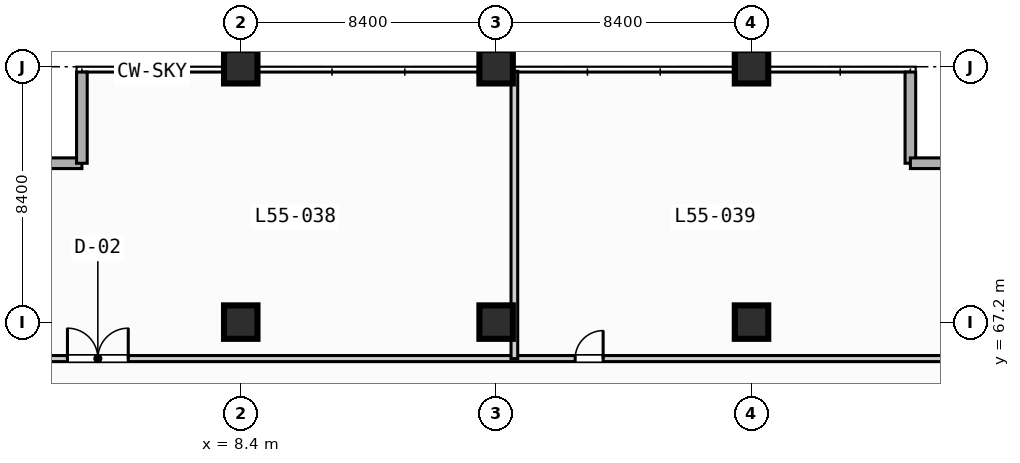
"""IFC4 building model, lengths in metres.
Left out: names, types, materials, properties, quantities, classifications, styles, units other than length and angle.
Written with IfcOpenShell. Run it as: python <this file> out.ifc"""

import sys

from ifc_helpers import new_model, si_unit, direction, frame, frame_2d, origin, origin_2d, place, context, subcontext, project, spatial, rectangle, extrude, element, fill, save


model = new_model("IFC4")
c1 = context("Model", 3, precision=1e-05, world=origin(), true_north=direction((0.0, 1.0)))
c2 = subcontext(c1, "Body", "Model", "MODEL_VIEW")
j1 = project(units=[si_unit("LENGTHUNIT", "METRE"), si_unit("PLANEANGLEUNIT", "RADIAN")], contexts=[c1])
p1 = place(None, origin())
s1 = spatial("IfcSite", under=j1, at=p1, CompositionType="ELEMENT")
p2 = place(p1, origin())
s2 = spatial("IfcBuilding", under=s1, at=p2, CompositionType="ELEMENT")
p3 = place(p2, frame((0.0, 0.0, 224.0)))
s3 = spatial("IfcBuildingStorey", under=s2, at=p3, CompositionType="ELEMENT", Elevation=224.0)
for number, where, z_axis, x_axis in (
    (1, (8.4, 67.2, 0.0), (0.0, 0.0, 1.0), (1.0, 0.0, 0.0)),
    (2, (8.4, 75.6, 0.0), (0.0, 0.0, 1.0), (1.0, 0.0, 0.0)),
    (3, (16.8, 67.2, 0.0), (0.0, 0.0, 1.0), (1.0, 0.0, 0.0)),
    (4, (16.8, 75.6, 0.0), (0.0, 0.0, 1.0), (1.0, 0.0, 0.0)),
    (5, (25.2, 67.2, 0.0), (0.0, 0.0, 1.0), (1.0, 0.0, 0.0)),
    (6, (25.2, 75.6, 0.0), (0.0, 0.0, 1.0), (1.0, 0.0, 0.0)),
):
    element("IfcColumn", number, at=place(p3, frame(where, z_axis=z_axis, x_axis=x_axis)), inside=s3, PredefinedType="COLUMN", context=c2, shape_type="SweptSolid", body=[
        extrude(rectangle(XDim=1.1, YDim=1.1, at=origin_2d()), origin(), (0.0, 0.0, 1.0), 4.2),
    ])
for number, where, z_axis, x_axis in (
    (7, (0.175, 72.425, 0.0), (0.0, 0.0, 1.0), (1.0, 0.0, 0.0)),
    (8, (3.175, 72.425, 0.0), (0.0, 0.0, 1.0), (0.0, 1.0, 0.0)),
    (9, (30.425, 75.425, 0.0), (0.0, 0.0, 1.0), (0.0, -1.0, 0.0)),
    (10, (30.425, 72.425, 0.0), (0.0, 0.0, 1.0), (1.0, 0.0, 0.0)),
):
    element("IfcWall", number, at=place(p3, frame(where, z_axis=z_axis, x_axis=x_axis)), inside=s3, PredefinedType="STANDARD", context=c2, shape_type="SweptSolid", body=[
        extrude(rectangle(XDim=3.0, YDim=0.35, at=frame_2d((1.5, 0.0))), origin(), (0.0, 0.0, 1.0), 3.75),
    ])
p4 = place(p3, frame((0.3, 66.0, 0.0), z_axis=(0.0, 0.0, 1.0), x_axis=(1.0, 0.0, 0.0)))
e11 = element("IfcWall", 11, at=p4, inside=s3, PredefinedType="PARTITIONING", context=c2, shape_type="SweptSolid", body=[
    extrude(rectangle(XDim=33.0, YDim=0.2, at=frame_2d((16.5, 0.0))), origin(), (0.0, 0.0, 1.0), 3.75),
])
p5 = place(p4, frame((2.4, 0.0, 0.0)))
e12 = element("IfcOpeningElement", 12, at=p5, cuts=e11, PredefinedType="OPENING", context=c2, shape_type="SweptSolid", body=[
    extrude(rectangle(XDim=2.0, YDim=2.15, at=frame_2d((1.0, 1.075))), frame((0.0, 0.11, 0.0), z_axis=(0.0, -1.0, 0.0), x_axis=(1.0, 0.0, 0.0)), (0.0, 0.0, 1.0), 0.22),
])
p6 = place(p4, frame((19.1, 0.0, 0.0)))
e13 = element("IfcOpeningElement", 13, at=p6, cuts=e11, PredefinedType="OPENING", context=c2, shape_type="SweptSolid", body=[
    extrude(rectangle(XDim=0.92, YDim=2.1, at=frame_2d((0.46, 1.05))), frame((0.0, 0.11, 0.0), z_axis=(0.0, -1.0, 0.0), x_axis=(1.0, 0.0, 0.0)), (0.0, 0.0, 1.0), 0.22),
])
p7 = place(p3, frame((17.4, 66.0, 0.0), z_axis=(0.0, 0.0, 1.0), x_axis=(0.0, 1.0, 0.0)))
e14 = element("IfcWall", 14, at=p7, inside=s3, PredefinedType="PARTITIONING", context=c2, shape_type="SweptSolid", body=[
    extrude(rectangle(XDim=9.45, YDim=0.22, at=frame_2d((4.725, 0.0))), origin(), (0.0, 0.0, 1.0), 3.75),
])
p8 = place(p5, origin())
e15 = element("IfcDoor", 15, at=p8, inside=s3, OperationType="SINGLE_SWING_LEFT", PredefinedType="DOOR", context=c2, shape_type="SweptSolid", body=[
    extrude(rectangle(XDim=2.0, YDim=2.15, at=frame_2d((1.0, 1.075))), frame((0.0, 0.025, 0.0), z_axis=(0.0, -1.0, 0.0), x_axis=(1.0, 0.0, 0.0)), (0.0, 0.0, 1.0), 0.05),
])
fill(e12, e15)
p9 = place(p6, origin())
e16 = element("IfcDoor", 16, at=p9, inside=s3, OperationType="SINGLE_SWING_RIGHT", PredefinedType="DOOR", context=c2, shape_type="SweptSolid", body=[
    extrude(rectangle(XDim=0.92, YDim=2.1, at=frame_2d((0.46, 1.05))), frame((0.0, 0.025, 0.0), z_axis=(0.0, -1.0, 0.0), x_axis=(1.0, 0.0, 0.0)), (0.0, 0.0, 1.0), 0.05),
])
fill(e13, e16)
save(model, sys.argv[1])
